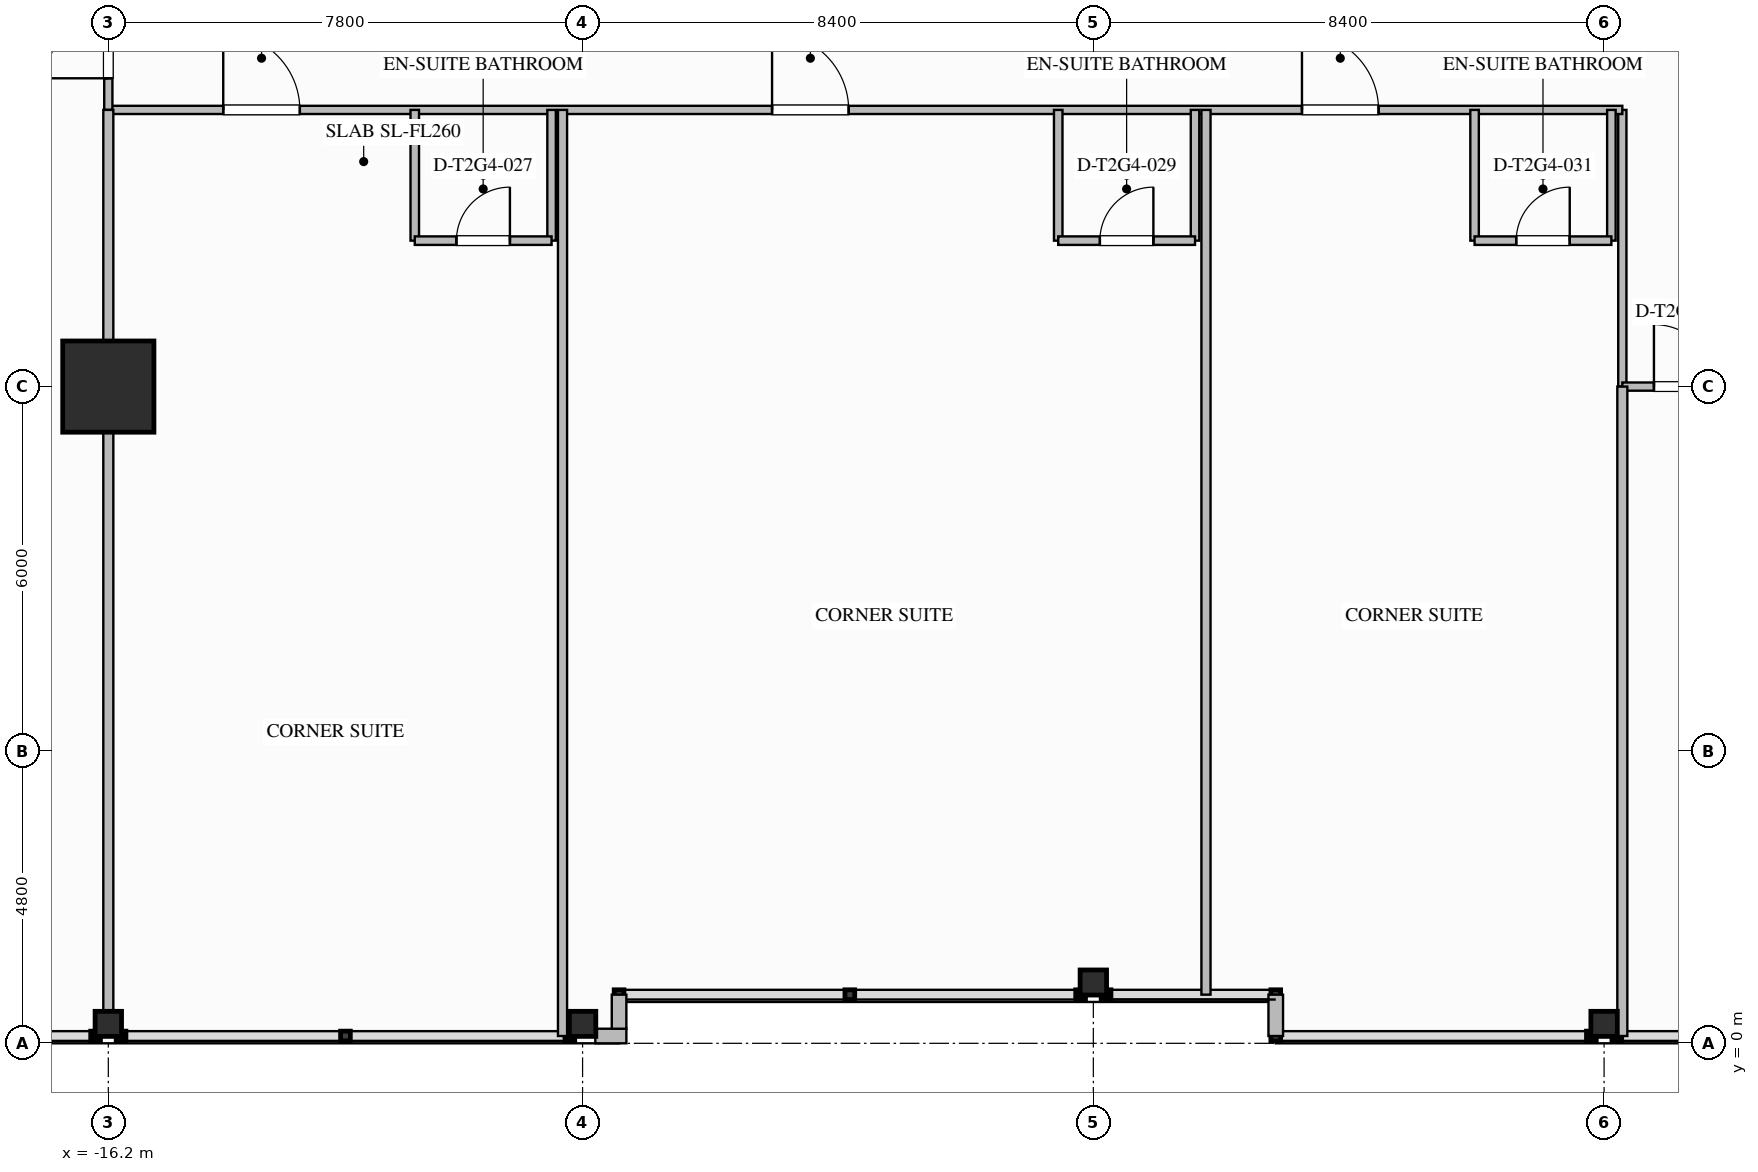
"""IFC4 building model, lengths in metres.
Left out: names, types, materials, properties, quantities, classifications, styles, units other than length and angle.
Written with IfcOpenShell. Run it as: python <this file> out.ifc"""

import sys

from ifc_helpers import new_model, si_unit, direction, frame, frame_2d, origin, origin_2d, place, context, subcontext, project, spatial, rectangle, i_section, extrude, element, fill, save


model = new_model("IFC4")
c1 = context("Model", 3, precision=1e-05, world=origin(), true_north=direction((0.0, 1.0)))
c2 = subcontext(c1, "Body", "Model", "MODEL_VIEW")
j1 = project(units=[si_unit("LENGTHUNIT", "METRE"), si_unit("PLANEANGLEUNIT", "RADIAN")], contexts=[c1])
p1 = place(None, origin())
s1 = spatial("IfcSite", under=j1, at=p1, CompositionType="ELEMENT")
p2 = place(p1, origin())
s2 = spatial("IfcBuilding", under=s1, at=p2, CompositionType="ELEMENT")
p3 = place(p2, frame((0.0, 0.0, 123.3)))
s3 = spatial("IfcBuildingStorey", under=s2, at=p3, CompositionType="ELEMENT", Elevation=123.3)
p4 = place(p3, frame((-16.2, 10.8, 0.0), z_axis=(0.0, 0.0, 1.0), x_axis=(1.0, 0.0, 0.0)))
e1 = element("IfcColumn", 1, at=p4, inside=s3, PredefinedType="COLUMN", context=c2, shape_type="SweptSolid", body=[
    extrude(rectangle(XDim=1.5, YDim=1.5, at=origin_2d()), origin(), (0.0, 0.0, 1.0), 3.5),
])
for number, where, z_axis, x_axis in (
    (2, (-16.2, 0.32, 0.0), (0.0, 0.0, 1.0), (0.0, 1.0, 0.0)),
    (3, (-8.4, 0.32, 0.0), (0.0, 0.0, 1.0), (0.0, 1.0, 0.0)),
    (4, (0.0, 1.0, 0.0), (0.0, 0.0, 1.0), (0.0, 1.0, 0.0)),
    (5, (8.4, 0.32, 0.0), (0.0, 0.0, 1.0), (0.0, 1.0, 0.0)),
):
    element("IfcColumn", number, at=place(p3, frame(where, z_axis=z_axis, x_axis=x_axis)), inside=s3, PredefinedType="COLUMN", context=c2, shape_type="SweptSolid", body=[
        extrude(i_section(OverallWidth=0.412, OverallDepth=0.435, WebThickness=0.036, FlangeThickness=0.057, FilletRadius=0.028, at=origin_2d()), origin(), (0.0, 0.0, 1.0), 3.497),
    ])
p5 = place(p3, frame((-7.68, 0.12, 0.0), z_axis=(0.0, 0.0, 1.0), x_axis=(-1.0, 0.0, 0.0)))
e6 = element("IfcWall", 6, at=p5, inside=s3, PredefinedType="STANDARD", context=c2, shape_type="SweptSolid", body=[
    extrude(rectangle(XDim=0.511, YDim=0.24, at=frame_2d((0.255, 0.0))), origin(), (0.0, 0.0, 1.0), 3.24),
])
p6 = place(p3, frame((3.0, 0.12, 0.0), z_axis=(0.0, 0.0, 1.0), x_axis=(0.0, 1.0, 0.0)))
e7 = element("IfcWall", 7, at=p6, inside=s3, PredefinedType="STANDARD", context=c2, shape_type="SweptSolid", body=[
    extrude(rectangle(XDim=0.68, YDim=0.24, at=frame_2d((0.34, 0.0))), origin(), (0.0, 0.0, 1.0), 3.24),
])
p7 = place(p3, frame((-7.8, 0.8, 0.0), z_axis=(0.0, 0.0, 1.0), x_axis=(0.0, -1.0, 0.0)))
e8 = element("IfcWall", 8, at=p7, inside=s3, PredefinedType="STANDARD", context=c2, shape_type="SweptSolid", body=[
    extrude(rectangle(XDim=0.56, YDim=0.24, at=frame_2d((0.28, 0.0))), origin(), (0.0, 0.0, 1.0), 3.24),
])
p8 = place(p3, frame((8.7, 10.8, 0.0), z_axis=(0.0, 0.0, 1.0), x_axis=(0.0, 1.0, 0.0)))
e9 = element("IfcWall", 9, at=p8, inside=s3, PredefinedType="PARTITIONING", context=c2, shape_type="SweptSolid", body=[
    extrude(rectangle(XDim=4.55, YDim=0.135, at=frame_2d((2.275, 0.0))), origin(), (0.0, 0.0, 1.0), 3.24),
])
p9 = place(p3, frame((-16.2, 15.35, 0.0), z_axis=(0.0, 0.0, 1.0), x_axis=(1.0, 0.0, 0.0)))
e10 = element("IfcWall", 10, at=p9, inside=s3, PredefinedType="PARTITIONING", context=c2, shape_type="SweptSolid", body=[
    extrude(rectangle(XDim=24.9, YDim=0.135, at=frame_2d((12.45, 0.0))), origin(), (0.0, 0.0, 1.0), 3.24),
])
p10 = place(p9, frame((1.89, 0.0, 0.0)))
e11 = element("IfcOpeningElement", 11, at=p10, cuts=e10, PredefinedType="OPENING", context=c2, shape_type="SweptSolid", body=[
    extrude(rectangle(XDim=1.26, YDim=2.2, at=frame_2d((0.63, 1.1))), frame((0.0, 0.077, 0.0), z_axis=(0.0, -1.0, 0.0), x_axis=(1.0, 0.0, 0.0)), (0.0, 0.0, 1.0), 0.155),
])
p11 = place(p9, frame((10.916, 0.0, 0.0)))
e12 = element("IfcOpeningElement", 12, at=p11, cuts=e10, PredefinedType="OPENING", context=c2, shape_type="SweptSolid", body=[
    extrude(rectangle(XDim=1.26, YDim=2.2, at=frame_2d((0.63, 1.1))), frame((0.0, 0.077, 0.0), z_axis=(0.0, -1.0, 0.0), x_axis=(1.0, 0.0, 0.0)), (0.0, 0.0, 1.0), 0.155),
])
p12 = place(p9, frame((19.631, 0.0, 0.0)))
e13 = element("IfcOpeningElement", 13, at=p12, cuts=e10, PredefinedType="OPENING", context=c2, shape_type="SweptSolid", body=[
    extrude(rectangle(XDim=1.26, YDim=2.2, at=frame_2d((0.63, 1.1))), frame((0.0, 0.077, 0.0), z_axis=(0.0, -1.0, 0.0), x_axis=(1.0, 0.0, 0.0)), (0.0, 0.0, 1.0), 0.155),
])
p13 = place(p3, frame((-16.2, 15.35, 0.0), z_axis=(0.0, 0.0, 1.0), x_axis=(0.0, 1.0, 0.0)))
e14 = element("IfcWall", 14, at=p13, inside=s3, PredefinedType="PARTITIONING", context=c2, shape_type="SweptSolid", body=[
    extrude(rectangle(XDim=2.95, YDim=0.135, at=frame_2d((1.475, 0.0))), origin(), (0.0, 0.0, 1.0), 2.53),
])
p14 = place(p13, frame((0.52, 0.0, 0.0)))
e15 = element("IfcOpeningElement", 15, at=p14, cuts=e14, PredefinedType="OPENING", context=c2, shape_type="SweptSolid", body=[
    extrude(rectangle(XDim=1.02, YDim=2.15, at=frame_2d((0.51, 1.075))), frame((0.0, 0.077, 0.0), z_axis=(0.0, -1.0, 0.0), x_axis=(1.0, 0.0, 0.0)), (0.0, 0.0, 1.0), 0.155),
])
p15 = place(p3, frame((8.7, 10.8, 0.0), z_axis=(0.0, 0.0, 1.0), x_axis=(1.0, 0.0, 0.0)))
e16 = element("IfcWall", 16, at=p15, inside=s3, PredefinedType="PARTITIONING", context=c2, shape_type="SweptSolid", body=[
    extrude(rectangle(XDim=2.75, YDim=0.135, at=frame_2d((1.375, 0.0))), origin(), (0.0, 0.0, 1.0), 2.53),
])
p16 = place(p15, frame((0.52, 0.0, 0.0)))
e17 = element("IfcOpeningElement", 17, at=p16, cuts=e16, PredefinedType="OPENING", context=c2, shape_type="SweptSolid", body=[
    extrude(rectangle(XDim=1.02, YDim=2.15, at=frame_2d((0.51, 1.075))), frame((0.0, 0.077, 0.0), z_axis=(0.0, -1.0, 0.0), x_axis=(1.0, 0.0, 0.0)), (0.0, 0.0, 1.0), 0.155),
])
p17 = place(p3, frame((-16.2, 0.12, 0.0), z_axis=(0.0, 0.0, 1.0), x_axis=(0.0, 1.0, 0.0)))
e18 = element("IfcWall", 18, at=p17, inside=s3, PredefinedType="PARTITIONING", context=c2, shape_type="SweptSolid", body=[
    extrude(rectangle(XDim=15.23, YDim=0.165, at=frame_2d((7.615, 0.0))), origin(), (0.0, 0.0, 1.0), 2.53),
])
p18 = place(p3, frame((8.7, 0.12, 0.0), z_axis=(0.0, 0.0, 1.0), x_axis=(0.0, 1.0, 0.0)))
e19 = element("IfcWall", 19, at=p18, inside=s3, PredefinedType="PARTITIONING", context=c2, shape_type="SweptSolid", body=[
    extrude(rectangle(XDim=10.68, YDim=0.165, at=frame_2d((5.34, 0.0))), origin(), (0.0, 0.0, 1.0), 2.53),
])
for number, where, z_axis, x_axis in (
    (20, (-11.16, 15.35, 0.0), (0.0, 0.0, 1.0), (0.0, -1.0, 0.0)),
    (21, (-8.91, 15.35, 0.0), (0.0, 0.0, 1.0), (0.0, -1.0, 0.0)),
):
    element("IfcWall", number, at=place(p3, frame(where, z_axis=z_axis, x_axis=x_axis)), inside=s3, PredefinedType="PLUMBINGWALL", context=c2, shape_type="SweptSolid", body=[
        extrude(rectangle(XDim=2.15, YDim=0.14, at=frame_2d((1.075, 0.0))), origin(), (0.0, 0.0, 1.0), 3.24),
    ])
p19 = place(p3, frame((-11.16, 13.2, 0.0), z_axis=(0.0, 0.0, 1.0), x_axis=(1.0, 0.0, 0.0)))
e22 = element("IfcWall", 22, at=p19, inside=s3, PredefinedType="PLUMBINGWALL", context=c2, shape_type="SweptSolid", body=[
    extrude(rectangle(XDim=2.25, YDim=0.14, at=frame_2d((1.125, 0.0))), origin(), (0.0, 0.0, 1.0), 3.24),
])
p20 = place(p19, frame((0.685, 0.0, 0.0)))
e23 = element("IfcOpeningElement", 23, at=p20, cuts=e22, PredefinedType="OPENING", context=c2, shape_type="SweptSolid", body=[
    extrude(rectangle(XDim=0.88, YDim=2.1, at=frame_2d((0.44, 1.05))), frame((0.0, 0.08, 0.0), z_axis=(0.0, -1.0, 0.0), x_axis=(1.0, 0.0, 0.0)), (0.0, 0.0, 1.0), 0.16),
])
p21 = place(p3, frame((-8.73, 0.12, 0.0), z_axis=(0.0, 0.0, 1.0), x_axis=(0.0, 1.0, 0.0)))
e24 = element("IfcWall", 24, at=p21, inside=s3, PredefinedType="PARTITIONING", context=c2, shape_type="SweptSolid", body=[
    extrude(rectangle(XDim=15.23, YDim=0.15, at=frame_2d((7.615, 0.0))), origin(), (0.0, 0.0, 1.0), 2.53),
])
for number, where, z_axis, x_axis in (
    (25, (-0.577, 15.35, 0.0), (0.0, 0.0, 1.0), (0.0, -1.0, 0.0)),
    (26, (1.673, 15.35, 0.0), (0.0, 0.0, 1.0), (0.0, -1.0, 0.0)),
):
    element("IfcWall", number, at=place(p3, frame(where, z_axis=z_axis, x_axis=x_axis)), inside=s3, PredefinedType="PLUMBINGWALL", context=c2, shape_type="SweptSolid", body=[
        extrude(rectangle(XDim=2.15, YDim=0.14, at=frame_2d((1.075, 0.0))), origin(), (0.0, 0.0, 1.0), 3.24),
    ])
p22 = place(p3, frame((-0.577, 13.2, 0.0), z_axis=(0.0, 0.0, 1.0), x_axis=(1.0, 0.0, 0.0)))
e27 = element("IfcWall", 27, at=p22, inside=s3, PredefinedType="PLUMBINGWALL", context=c2, shape_type="SweptSolid", body=[
    extrude(rectangle(XDim=2.25, YDim=0.14, at=frame_2d((1.125, 0.0))), origin(), (0.0, 0.0, 1.0), 3.24),
])
p23 = place(p22, frame((0.685, 0.0, 0.0)))
e28 = element("IfcOpeningElement", 28, at=p23, cuts=e27, PredefinedType="OPENING", context=c2, shape_type="SweptSolid", body=[
    extrude(rectangle(XDim=0.88, YDim=2.1, at=frame_2d((0.44, 1.05))), frame((0.0, 0.08, 0.0), z_axis=(0.0, -1.0, 0.0), x_axis=(1.0, 0.0, 0.0)), (0.0, 0.0, 1.0), 0.16),
])
p24 = place(p3, frame((1.853, 0.8, 0.0), z_axis=(0.0, 0.0, 1.0), x_axis=(0.0, 1.0, 0.0)))
e29 = element("IfcWall", 29, at=p24, inside=s3, PredefinedType="PARTITIONING", context=c2, shape_type="SweptSolid", body=[
    extrude(rectangle(XDim=14.55, YDim=0.15, at=frame_2d((7.275, 0.0))), origin(), (0.0, 0.0, 1.0), 3.24),
])
p25 = place(p3, frame((6.27, 15.35, 0.0), z_axis=(0.0, 0.0, 1.0), x_axis=(0.0, -1.0, 0.0)))
e30 = element("IfcWall", 30, at=p25, inside=s3, PredefinedType="PLUMBINGWALL", context=c2, shape_type="SweptSolid", body=[
    extrude(rectangle(XDim=2.15, YDim=0.14, at=frame_2d((1.075, 0.0))), origin(), (0.0, 0.0, 1.0), 3.24),
])
p26 = place(p3, frame((8.52, 15.35, 0.0), z_axis=(0.0, 0.0, 1.0), x_axis=(0.0, -1.0, 0.0)))
e31 = element("IfcWall", 31, at=p26, inside=s3, PredefinedType="PLUMBINGWALL", context=c2, shape_type="SweptSolid", body=[
    extrude(rectangle(XDim=2.15, YDim=0.14, at=frame_2d((1.075, 0.0))), origin(), (0.0, 0.0, 1.0), 2.617),
])
p27 = place(p3, frame((6.27, 13.2, 0.0), z_axis=(0.0, 0.0, 1.0), x_axis=(1.0, 0.0, 0.0)))
e32 = element("IfcWall", 32, at=p27, inside=s3, PredefinedType="PLUMBINGWALL", context=c2, shape_type="SweptSolid", body=[
    extrude(rectangle(XDim=2.25, YDim=0.14, at=frame_2d((1.125, 0.0))), origin(), (0.0, 0.0, 1.0), 3.24),
])
p28 = place(p27, frame((0.685, 0.0, 0.0)))
e33 = element("IfcOpeningElement", 33, at=p28, cuts=e32, PredefinedType="OPENING", context=c2, shape_type="SweptSolid", body=[
    extrude(rectangle(XDim=0.88, YDim=2.1, at=frame_2d((0.44, 1.05))), frame((0.0, 0.08, 0.0), z_axis=(0.0, -1.0, 0.0), x_axis=(1.0, 0.0, 0.0)), (0.0, 0.0, 1.0), 0.16),
])
p29 = place(p14, origin())
e34 = element("IfcDoor", 34, at=p29, inside=s3, OperationType="SINGLE_SWING_LEFT", PredefinedType="DOOR", context=c2, shape_type="SweptSolid", body=[
    extrude(rectangle(XDim=1.02, YDim=2.15, at=frame_2d((0.51, 1.075))), frame((0.0, 0.025, 0.0), z_axis=(0.0, -1.0, 0.0), x_axis=(1.0, 0.0, 0.0)), (0.0, 0.0, 1.0), 0.05),
])
fill(e15, e34)
p30 = place(p16, origin())
e35 = element("IfcDoor", 35, at=p30, inside=s3, OperationType="SINGLE_SWING_LEFT", PredefinedType="DOOR", context=c2, shape_type="SweptSolid", body=[
    extrude(rectangle(XDim=1.02, YDim=2.15, at=frame_2d((0.51, 1.075))), frame((0.0, 0.025, 0.0), z_axis=(0.0, -1.0, 0.0), x_axis=(1.0, 0.0, 0.0)), (0.0, 0.0, 1.0), 0.05),
])
fill(e17, e35)
p31 = place(p20, origin())
e36 = element("IfcDoor", 36, at=p31, inside=s3, OperationType="SINGLE_SWING_RIGHT", PredefinedType="DOOR", context=c2, shape_type="SweptSolid", body=[
    extrude(rectangle(XDim=0.88, YDim=2.1, at=frame_2d((0.44, 1.05))), frame((0.0, 0.025, 0.0), z_axis=(0.0, -1.0, 0.0), x_axis=(1.0, 0.0, 0.0)), (0.0, 0.0, 1.0), 0.05),
])
fill(e23, e36)
p32 = place(p10, origin())
e37 = element("IfcDoor", 37, at=p32, inside=s3, OperationType="SINGLE_SWING_LEFT", PredefinedType="DOOR", context=c2, shape_type="SweptSolid", body=[
    extrude(rectangle(XDim=1.26, YDim=2.2, at=frame_2d((0.63, 1.1))), frame((0.0, 0.025, 0.0), z_axis=(0.0, -1.0, 0.0), x_axis=(1.0, 0.0, 0.0)), (0.0, 0.0, 1.0), 0.05),
])
fill(e11, e37)
p33 = place(p23, origin())
e38 = element("IfcDoor", 38, at=p33, inside=s3, OperationType="SINGLE_SWING_RIGHT", PredefinedType="DOOR", context=c2, shape_type="SweptSolid", body=[
    extrude(rectangle(XDim=0.88, YDim=2.1, at=frame_2d((0.44, 1.05))), frame((0.0, 0.025, 0.0), z_axis=(0.0, -1.0, 0.0), x_axis=(1.0, 0.0, 0.0)), (0.0, 0.0, 1.0), 0.05),
])
fill(e28, e38)
p34 = place(p11, origin())
e39 = element("IfcDoor", 39, at=p34, inside=s3, OperationType="SINGLE_SWING_LEFT", PredefinedType="DOOR", context=c2, shape_type="SweptSolid", body=[
    extrude(rectangle(XDim=1.26, YDim=2.2, at=frame_2d((0.63, 1.1))), frame((0.0, 0.025, 0.0), z_axis=(0.0, -1.0, 0.0), x_axis=(1.0, 0.0, 0.0)), (0.0, 0.0, 1.0), 0.05),
])
fill(e12, e39)
p35 = place(p28, origin())
e40 = element("IfcDoor", 40, at=p35, inside=s3, OperationType="SINGLE_SWING_RIGHT", PredefinedType="DOOR", context=c2, shape_type="SweptSolid", body=[
    extrude(rectangle(XDim=0.88, YDim=2.1, at=frame_2d((0.44, 1.05))), frame((0.0, 0.025, 0.0), z_axis=(0.0, -1.0, 0.0), x_axis=(1.0, 0.0, 0.0)), (0.0, 0.0, 1.0), 0.05),
])
fill(e33, e40)
p36 = place(p12, origin())
e41 = element("IfcDoor", 41, at=p36, inside=s3, OperationType="SINGLE_SWING_LEFT", PredefinedType="DOOR", context=c2, shape_type="SweptSolid", body=[
    extrude(rectangle(XDim=1.26, YDim=2.2, at=frame_2d((0.63, 1.1))), frame((0.0, 0.025, 0.0), z_axis=(0.0, -1.0, 0.0), x_axis=(1.0, 0.0, 0.0)), (0.0, 0.0, 1.0), 0.05),
])
fill(e13, e41)
save(model, sys.argv[1])
